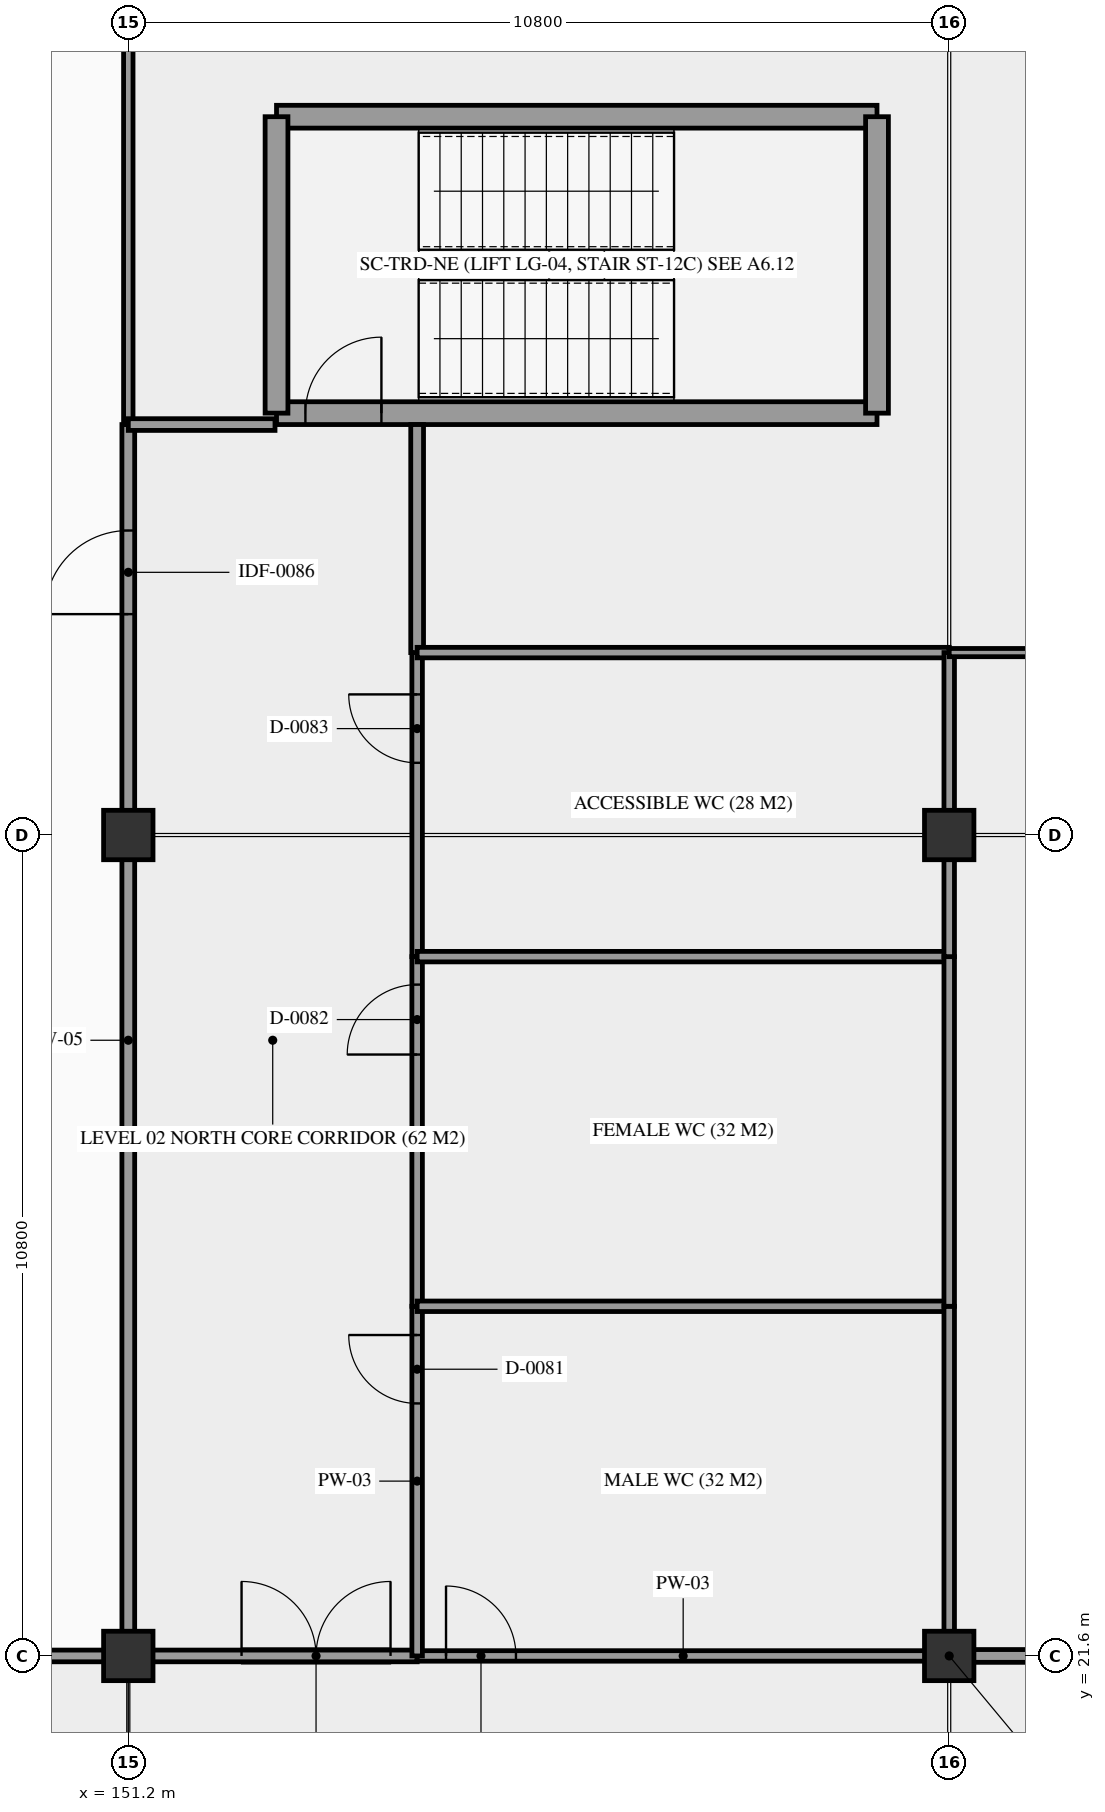
"""IFC4 building model, lengths in metres.
Left out: names, types, materials, properties, quantities, classifications, styles, units other than length and angle.
Written with IfcOpenShell. Run it as: python <this file> out.ifc"""

import sys

from ifc_helpers import new_model, si_unit, direction, frame, frame_2d, origin, origin_2d, place, context, subcontext, project, spatial, rectangle, extrude, element, fill, save


model = new_model("IFC4")
c1 = context("Model", 3, precision=1e-05, world=origin(), true_north=direction((0.0, 1.0)))
c2 = subcontext(c1, "Body", "Model", "MODEL_VIEW")
j1 = project(units=[si_unit("LENGTHUNIT", "METRE"), si_unit("PLANEANGLEUNIT", "RADIAN")], contexts=[c1])
p1 = place(None, origin())
s1 = spatial("IfcSite", under=j1, at=p1, CompositionType="ELEMENT")
p2 = place(p1, origin())
s2 = spatial("IfcBuilding", under=s1, at=p2, CompositionType="ELEMENT")
p3 = place(p2, frame((0.0, 0.0, 10.08)))
s3 = spatial("IfcBuildingStorey", under=s2, at=p3, CompositionType="ELEMENT", Elevation=10.08)
for number, where, z_axis, x_axis in (
    (1, (151.2, 21.6, 0.0), (0.0, 0.0, 1.0), (1.0, 0.0, 0.0)),
    (2, (151.2, 32.4, 0.0), (0.0, 0.0, 1.0), (1.0, 0.0, 0.0)),
    (3, (162.0, 21.6, 0.0), (0.0, 0.0, 1.0), (1.0, 0.0, 0.0)),
    (4, (162.0, 32.4, 0.0), (0.0, 0.0, 1.0), (1.0, 0.0, 0.0)),
):
    element("IfcColumn", number, at=place(p3, frame(where, z_axis=z_axis, x_axis=x_axis)), inside=s3, PredefinedType="COLUMN", context=c2, shape_type="SweptSolid", body=[
        extrude(rectangle(XDim=0.65, YDim=0.65, at=origin_2d()), origin(), (0.0, 0.0, 1.0), 4.68),
    ])
p4 = place(p3, frame((153.15, 37.95, 0.0), z_axis=(0.0, 0.0, 1.0), x_axis=(1.0, 0.0, 0.0)))
e5 = element("IfcWall", 5, at=p4, inside=s3, PredefinedType="SHEAR", context=c2, shape_type="SweptSolid", body=[
    extrude(rectangle(XDim=7.9, YDim=0.3, at=frame_2d((3.95, 0.0))), origin(), (0.0, 0.0, 1.0), 4.68),
])
p5 = place(p4, frame((0.38, 0.0, 0.0)))
e6 = element("IfcOpeningElement", 6, at=p5, cuts=e5, PredefinedType="OPENING", context=c2, shape_type="SweptSolid", body=[
    extrude(rectangle(XDim=1.0, YDim=2.15, at=frame_2d((0.5, 1.075))), frame((0.0, 0.16, 0.0), z_axis=(0.0, -1.0, 0.0), x_axis=(1.0, 0.0, 0.0)), (0.0, 0.0, 1.0), 0.32),
])
p6 = place(p3, frame((153.15, 41.85, 0.0), z_axis=(0.0, 0.0, 1.0), x_axis=(1.0, 0.0, 0.0)))
e7 = element("IfcWall", 7, at=p6, inside=s3, PredefinedType="SHEAR", context=c2, shape_type="SweptSolid", body=[
    extrude(rectangle(XDim=7.9, YDim=0.3, at=frame_2d((3.95, 0.0))), origin(), (0.0, 0.0, 1.0), 4.68),
])
for number, where, z_axis, x_axis in (
    (8, (153.15, 37.95, 0.0), (0.0, 0.0, 1.0), (0.0, 1.0, 0.0)),
    (9, (161.05, 37.95, 0.0), (0.0, 0.0, 1.0), (0.0, 1.0, 0.0)),
):
    element("IfcWall", number, at=place(p3, frame(where, z_axis=z_axis, x_axis=x_axis)), inside=s3, PredefinedType="SHEAR", context=c2, shape_type="SweptSolid", body=[
        extrude(rectangle(XDim=3.9, YDim=0.3, at=frame_2d((1.95, 0.0))), origin(), (0.0, 0.0, 1.0), 4.68),
    ])
p7 = place(p3, frame((151.2, 21.6, 0.0), z_axis=(0.0, 0.0, 1.0), x_axis=(1.0, 0.0, 0.0)))
e10 = element("IfcWall", 10, at=p7, inside=s3, PredefinedType="PARTITIONING", context=c2, shape_type="SweptSolid", body=[
    extrude(rectangle(XDim=3.8, YDim=0.154, at=frame_2d((1.9, 0.0))), origin(), (0.0, 0.0, 1.0), 3.23),
])
p8 = place(p7, frame((1.49, 0.0, 0.0)))
e11 = element("IfcOpeningElement", 11, at=p8, cuts=e10, PredefinedType="OPENING", context=c2, shape_type="SweptSolid", body=[
    extrude(rectangle(XDim=1.96, YDim=2.3, at=frame_2d((0.98, 1.15))), frame((0.0, 0.087, 0.0), z_axis=(0.0, -1.0, 0.0), x_axis=(1.0, 0.0, 0.0)), (0.0, 0.0, 1.0), 0.174),
])
p9 = place(p3, frame((155.0, 21.6, 0.0), z_axis=(0.0, 0.0, 1.0), x_axis=(1.0, 0.0, 0.0)))
e12 = element("IfcWall", 12, at=p9, inside=s3, PredefinedType="PARTITIONING", context=c2, shape_type="SweptSolid", body=[
    extrude(rectangle(XDim=7.0, YDim=0.138, at=frame_2d((3.5, 0.0))), origin(), (0.0, 0.0, 1.0), 3.23),
])
p10 = place(p9, frame((0.38, 0.0, 0.0)))
e13 = element("IfcOpeningElement", 13, at=p10, cuts=e12, PredefinedType="OPENING", context=c2, shape_type="SweptSolid", body=[
    extrude(rectangle(XDim=0.92, YDim=2.14, at=frame_2d((0.46, 1.07))), frame((0.0, 0.079, 0.0), z_axis=(0.0, -1.0, 0.0), x_axis=(1.0, 0.0, 0.0)), (0.0, 0.0, 1.0), 0.158),
])
p11 = place(p3, frame((155.0, 21.6, 0.0), z_axis=(0.0, 0.0, 1.0), x_axis=(0.0, 1.0, 0.0)))
e14 = element("IfcWall", 14, at=p11, inside=s3, PredefinedType="PARTITIONING", context=c2, shape_type="SweptSolid", body=[
    extrude(rectangle(XDim=4.6, YDim=0.138, at=frame_2d((2.3, 0.0))), origin(), (0.0, 0.0, 1.0), 3.23),
])
p12 = place(p11, frame((3.322, 0.0, 0.0)))
e15 = element("IfcOpeningElement", 15, at=p12, cuts=e14, PredefinedType="OPENING", context=c2, shape_type="SweptSolid", body=[
    extrude(rectangle(XDim=0.9, YDim=2.1, at=frame_2d((0.45, 1.05))), frame((0.0, 0.079, 0.0), z_axis=(0.0, -1.0, 0.0), x_axis=(1.0, 0.0, 0.0)), (0.0, 0.0, 1.0), 0.158),
])
p13 = place(p3, frame((155.0, 26.2, 0.0), z_axis=(0.0, 0.0, 1.0), x_axis=(0.0, 1.0, 0.0)))
e16 = element("IfcWall", 16, at=p13, inside=s3, PredefinedType="PARTITIONING", context=c2, shape_type="SweptSolid", body=[
    extrude(rectangle(XDim=4.6, YDim=0.138, at=frame_2d((2.3, 0.0))), origin(), (0.0, 0.0, 1.0), 3.23),
])
p14 = place(p13, frame((3.312, 0.0, 0.0)))
e17 = element("IfcOpeningElement", 17, at=p14, cuts=e16, PredefinedType="OPENING", context=c2, shape_type="SweptSolid", body=[
    extrude(rectangle(XDim=0.92, YDim=2.14, at=frame_2d((0.46, 1.07))), frame((0.0, 0.079, 0.0), z_axis=(0.0, -1.0, 0.0), x_axis=(1.0, 0.0, 0.0)), (0.0, 0.0, 1.0), 0.158),
])
p15 = place(p3, frame((155.0, 30.8, 0.0), z_axis=(0.0, 0.0, 1.0), x_axis=(0.0, 1.0, 0.0)))
e18 = element("IfcWall", 18, at=p15, inside=s3, PredefinedType="PARTITIONING", context=c2, shape_type="SweptSolid", body=[
    extrude(rectangle(XDim=4.0, YDim=0.138, at=frame_2d((2.0, 0.0))), origin(), (0.0, 0.0, 1.0), 3.23),
])
p16 = place(p15, frame((2.55, 0.0, 0.0)))
e19 = element("IfcOpeningElement", 19, at=p16, cuts=e18, PredefinedType="OPENING", context=c2, shape_type="SweptSolid", body=[
    extrude(rectangle(XDim=0.9, YDim=2.1, at=frame_2d((0.45, 1.05))), frame((0.0, 0.079, 0.0), z_axis=(0.0, -1.0, 0.0), x_axis=(1.0, 0.0, 0.0)), (0.0, 0.0, 1.0), 0.158),
])
p17 = place(p3, frame((129.6, 21.6, 0.0), z_axis=(0.0, 0.0, 1.0), x_axis=(1.0, 0.0, 0.0)))
e20 = element("IfcWall", 20, at=p17, inside=s3, PredefinedType="PARTITIONING", context=c2, shape_type="SweptSolid", body=[
    extrude(rectangle(XDim=21.6, YDim=0.154, at=frame_2d((10.8, 0.0))), origin(), (0.0, 0.0, 1.0), 3.23),
])
p18 = place(p17, frame((3.388, 0.0, 0.0)))
e21 = element("IfcOpeningElement", 21, at=p18, cuts=e20, PredefinedType="OPENING", context=c2, shape_type="SweptSolid", body=[
    extrude(rectangle(XDim=1.0, YDim=2.15, at=frame_2d((0.5, 1.075))), frame((0.0, 0.087, 0.0), z_axis=(0.0, -1.0, 0.0), x_axis=(1.0, 0.0, 0.0)), (0.0, 0.0, 1.0), 0.174),
])
p19 = place(p3, frame((151.2, 21.6, 0.0), z_axis=(0.0, 0.0, 1.0), x_axis=(0.0, 1.0, 0.0)))
e22 = element("IfcWall", 22, at=p19, inside=s3, PredefinedType="PARTITIONING", context=c2, shape_type="SweptSolid", body=[
    extrude(rectangle(XDim=16.2, YDim=0.168, at=frame_2d((8.1, 0.0))), origin(), (0.0, 0.0, 1.0), 3.23),
])
p20 = place(p19, frame((13.706, 0.0, 0.0)))
e23 = element("IfcOpeningElement", 23, at=p20, cuts=e22, PredefinedType="OPENING", context=c2, shape_type="SweptSolid", body=[
    extrude(rectangle(XDim=1.1, YDim=2.2, at=frame_2d((0.55, 1.1))), frame((0.0, 0.094, 0.0), z_axis=(0.0, -1.0, 0.0), x_axis=(1.0, 0.0, 0.0)), (0.0, 0.0, 1.0), 0.188),
])
p21 = place(p3, frame((162.0, 21.6, 0.0), z_axis=(0.0, 0.0, 1.0), x_axis=(1.0, 0.0, 0.0)))
e24 = element("IfcWall", 24, at=p21, inside=s3, PredefinedType="PARTITIONING", context=c2, shape_type="SweptSolid", body=[
    extrude(rectangle(XDim=10.8, YDim=0.168, at=frame_2d((5.4, 0.0))), origin(), (0.0, 0.0, 1.0), 3.23),
])
p22 = place(p21, frame((2.15, 0.0, 0.0)))
e25 = element("IfcOpeningElement", 25, at=p22, cuts=e24, PredefinedType="OPENING", context=c2, shape_type="SweptSolid", body=[
    extrude(rectangle(XDim=1.1, YDim=2.2, at=frame_2d((0.55, 1.1))), frame((0.0, 0.094, 0.0), z_axis=(0.0, -1.0, 0.0), x_axis=(1.0, 0.0, 0.0)), (0.0, 0.0, 1.0), 0.188),
])
p23 = place(p3, frame((151.2, 37.8, 0.0), z_axis=(0.0, 0.0, 1.0), x_axis=(0.0, 1.0, 0.0)))
e26 = element("IfcWall", 26, at=p23, inside=s3, PredefinedType="PARTITIONING", context=c2, shape_type="SweptSolid", body=[
    extrude(rectangle(XDim=5.4, YDim=0.124, at=frame_2d((2.7, 0.0))), origin(), (0.0, 0.0, 1.0), 3.23),
])
p24 = place(p3, frame((151.2, 37.8, 0.0), z_axis=(0.0, 0.0, 1.0), x_axis=(1.0, 0.0, 0.0)))
e27 = element("IfcWall", 27, at=p24, inside=s3, PredefinedType="PARTITIONING", context=c2, shape_type="SweptSolid", body=[
    extrude(rectangle(XDim=1.93, YDim=0.154, at=frame_2d((0.965, 0.0))), origin(), (0.0, 0.0, 1.0), 3.23),
])
for number, where, z_axis, x_axis in (
    (28, (155.0, 26.2, 0.0), (0.0, 0.0, 1.0), (1.0, 0.0, 0.0)),
    (29, (155.0, 30.8, 0.0), (0.0, 0.0, 1.0), (1.0, 0.0, 0.0)),
):
    element("IfcWall", number, at=place(p3, frame(where, z_axis=z_axis, x_axis=x_axis)), inside=s3, PredefinedType="PARTITIONING", context=c2, shape_type="SweptSolid", body=[
        extrude(rectangle(XDim=7.0, YDim=0.138, at=frame_2d((3.5, 0.0))), origin(), (0.0, 0.0, 1.0), 3.23),
    ])
p25 = place(p3, frame((155.0, 34.8, 0.0), z_axis=(0.0, 0.0, 1.0), x_axis=(0.0, 1.0, 0.0)))
e30 = element("IfcWall", 30, at=p25, inside=s3, PredefinedType="PARTITIONING", context=c2, shape_type="SweptSolid", body=[
    extrude(rectangle(XDim=3.0, YDim=0.168, at=frame_2d((1.5, 0.0))), origin(), (0.0, 0.0, 1.0), 3.23),
])
p26 = place(p3, frame((155.0, 34.8, 0.0), z_axis=(0.0, 0.0, 1.0), x_axis=(1.0, 0.0, 0.0)))
e31 = element("IfcWall", 31, at=p26, inside=s3, PredefinedType="PARTITIONING", context=c2, shape_type="SweptSolid", body=[
    extrude(rectangle(XDim=7.0, YDim=0.138, at=frame_2d((3.5, 0.0))), origin(), (0.0, 0.0, 1.0), 3.23),
])
p27 = place(p3, frame((162.0, 21.6, 0.0), z_axis=(0.0, 0.0, 1.0), x_axis=(0.0, 1.0, 0.0)))
e32 = element("IfcWall", 32, at=p27, inside=s3, PredefinedType="PARTITIONING", context=c2, shape_type="SweptSolid", body=[
    extrude(rectangle(XDim=4.6, YDim=0.138, at=frame_2d((2.3, 0.0))), origin(), (0.0, 0.0, 1.0), 3.23),
])
p28 = place(p3, frame((162.0, 26.2, 0.0), z_axis=(0.0, 0.0, 1.0), x_axis=(0.0, 1.0, 0.0)))
e33 = element("IfcWall", 33, at=p28, inside=s3, PredefinedType="PARTITIONING", context=c2, shape_type="SweptSolid", body=[
    extrude(rectangle(XDim=4.6, YDim=0.138, at=frame_2d((2.3, 0.0))), origin(), (0.0, 0.0, 1.0), 3.23),
])
p29 = place(p3, frame((162.0, 30.8, 0.0), z_axis=(0.0, 0.0, 1.0), x_axis=(0.0, 1.0, 0.0)))
e34 = element("IfcWall", 34, at=p29, inside=s3, PredefinedType="PARTITIONING", context=c2, shape_type="SweptSolid", body=[
    extrude(rectangle(XDim=4.0, YDim=0.138, at=frame_2d((2.0, 0.0))), origin(), (0.0, 0.0, 1.0), 3.23),
])
p30 = place(p3, frame((162.0, 34.8, 0.0), z_axis=(0.0, 0.0, 1.0), x_axis=(1.0, 0.0, 0.0)))
e35 = element("IfcWall", 35, at=p30, inside=s3, PredefinedType="PARTITIONING", context=c2, shape_type="SweptSolid", body=[
    extrude(rectangle(XDim=10.8, YDim=0.108, at=frame_2d((5.4, 0.0))), origin(), (0.0, 0.0, 1.0), 3.23),
])
p31 = place(p5, frame((1.0, 0.0, 0.0), z_axis=(0.0, 0.0, 1.0), x_axis=(-1.0, 0.0, 0.0)))
e36 = element("IfcDoor", 36, at=p31, inside=s3, OperationType="SINGLE_SWING_RIGHT", PredefinedType="DOOR", context=c2, shape_type="SweptSolid", body=[
    extrude(rectangle(XDim=1.0, YDim=2.15, at=frame_2d((0.5, 1.075))), frame((0.0, 0.025, 0.0), z_axis=(0.0, -1.0, 0.0), x_axis=(1.0, 0.0, 0.0)), (0.0, 0.0, 1.0), 0.05),
])
fill(e6, e36)
p32 = place(p8, origin())
e37 = element("IfcDoor", 37, at=p32, inside=s3, OperationType="DOUBLE_DOOR_SINGLE_SWING", PredefinedType="DOOR", context=c2, shape_type="SweptSolid", body=[
    extrude(rectangle(XDim=1.96, YDim=2.3, at=frame_2d((0.98, 1.15))), frame((0.0, 0.025, 0.0), z_axis=(0.0, -1.0, 0.0), x_axis=(1.0, 0.0, 0.0)), (0.0, 0.0, 1.0), 0.05),
])
fill(e11, e37)
p33 = place(p10, origin())
e38 = element("IfcDoor", 38, at=p33, inside=s3, OperationType="SINGLE_SWING_LEFT", PredefinedType="DOOR", context=c2, shape_type="SweptSolid", body=[
    extrude(rectangle(XDim=0.92, YDim=2.14, at=frame_2d((0.46, 1.07))), frame((0.0, 0.025, 0.0), z_axis=(0.0, -1.0, 0.0), x_axis=(1.0, 0.0, 0.0)), (0.0, 0.0, 1.0), 0.05),
])
fill(e13, e38)
p34 = place(p12, frame((0.9, 0.0, 0.0), z_axis=(0.0, 0.0, 1.0), x_axis=(-1.0, 0.0, 0.0)))
e39 = element("IfcDoor", 39, at=p34, inside=s3, OperationType="SINGLE_SWING_RIGHT", PredefinedType="DOOR", context=c2, shape_type="SweptSolid", body=[
    extrude(rectangle(XDim=0.9, YDim=2.1, at=frame_2d((0.45, 1.05))), frame((0.0, 0.025, 0.0), z_axis=(0.0, -1.0, 0.0), x_axis=(1.0, 0.0, 0.0)), (0.0, 0.0, 1.0), 0.05),
])
fill(e15, e39)
p35 = place(p14, origin())
e40 = element("IfcDoor", 40, at=p35, inside=s3, OperationType="SINGLE_SWING_LEFT", PredefinedType="DOOR", context=c2, shape_type="SweptSolid", body=[
    extrude(rectangle(XDim=0.92, YDim=2.14, at=frame_2d((0.46, 1.07))), frame((0.0, 0.025, 0.0), z_axis=(0.0, -1.0, 0.0), x_axis=(1.0, 0.0, 0.0)), (0.0, 0.0, 1.0), 0.05),
])
fill(e17, e40)
p36 = place(p16, origin())
e41 = element("IfcDoor", 41, at=p36, inside=s3, OperationType="SINGLE_SWING_RIGHT", PredefinedType="DOOR", context=c2, shape_type="SweptSolid", body=[
    extrude(rectangle(XDim=0.9, YDim=2.1, at=frame_2d((0.45, 1.05))), frame((0.0, 0.025, 0.0), z_axis=(0.0, -1.0, 0.0), x_axis=(1.0, 0.0, 0.0)), (0.0, 0.0, 1.0), 0.05),
])
fill(e19, e41)
p37 = place(p20, origin())
e42 = element("IfcDoor", 42, at=p37, inside=s3, OperationType="SINGLE_SWING_LEFT", PredefinedType="DOOR", context=c2, shape_type="SweptSolid", body=[
    extrude(rectangle(XDim=1.1, YDim=2.2, at=frame_2d((0.55, 1.1))), frame((0.0, 0.025, 0.0), z_axis=(0.0, -1.0, 0.0), x_axis=(1.0, 0.0, 0.0)), (0.0, 0.0, 1.0), 0.05),
])
fill(e23, e42)
save(model, sys.argv[1])
